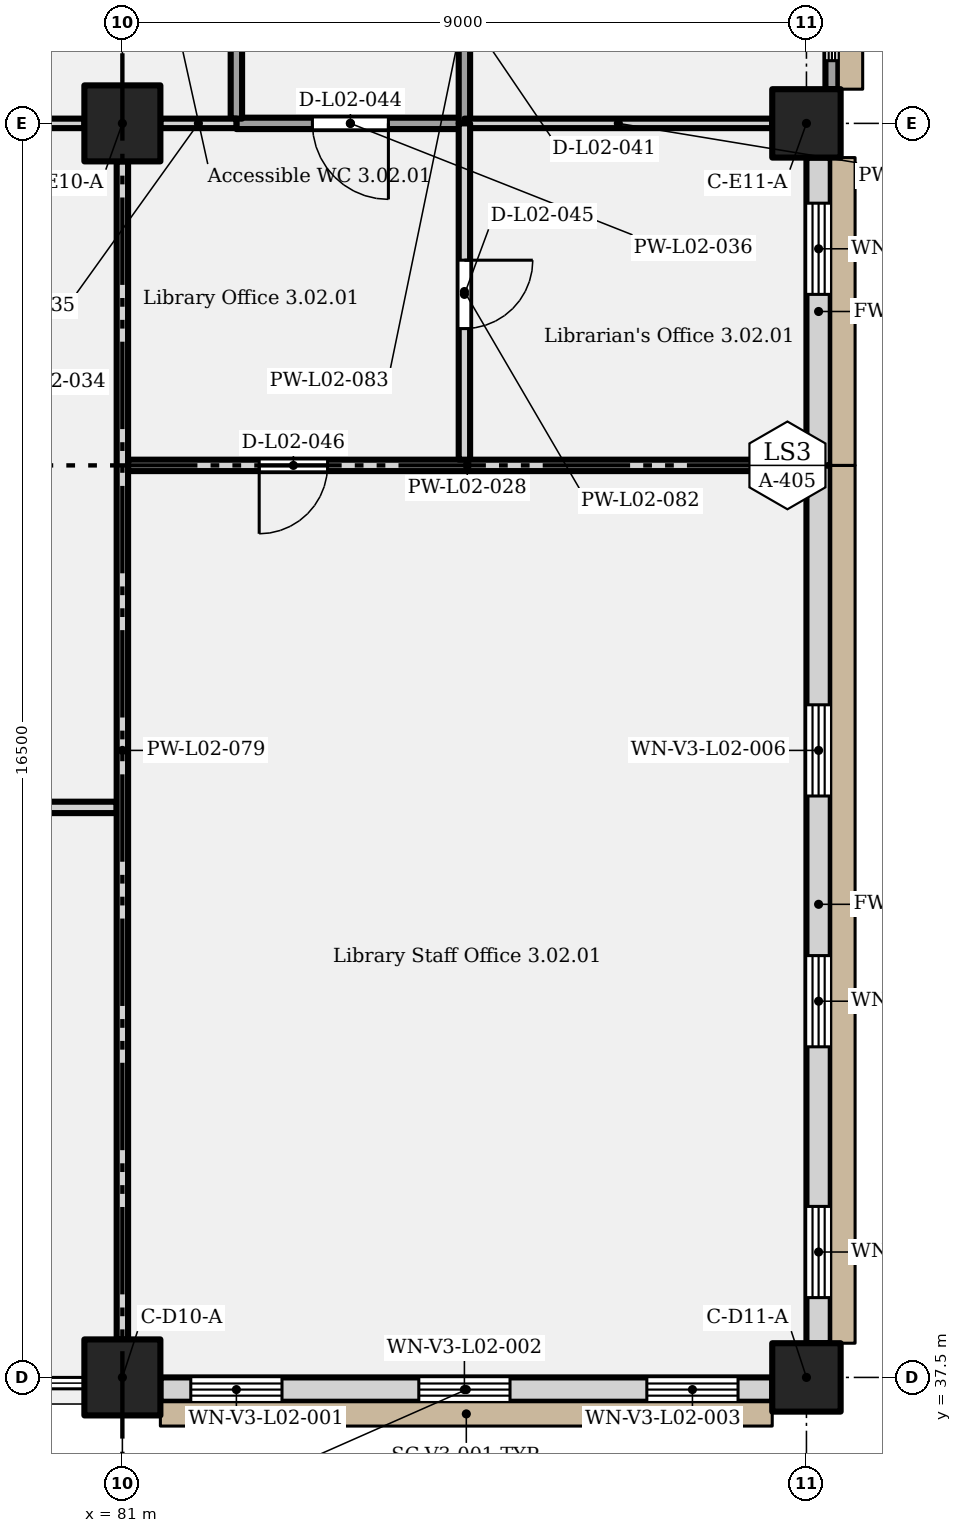
"""IFC4 building model, lengths in metres.
Left out: names, types, materials, properties, quantities, classifications, styles, units other than length and angle.
Written with IfcOpenShell. Run it as: python <this file> out.ifc"""

import sys

from ifc_helpers import new_model, si_unit, direction, frame, frame_2d, origin, origin_2d, place, context, subcontext, project, spatial, rectangle, extrude, element, fill, save


model = new_model("IFC4")
c1 = context("Model", 3, precision=1e-05, world=origin(), true_north=direction((0.0, 1.0)))
c2 = subcontext(c1, "Body", "Model", "MODEL_VIEW")
j1 = project(units=[si_unit("LENGTHUNIT", "METRE"), si_unit("PLANEANGLEUNIT", "RADIAN")], contexts=[c1])
p1 = place(None, origin())
s1 = spatial("IfcSite", under=j1, at=p1, CompositionType="ELEMENT")
p2 = place(p1, origin())
s2 = spatial("IfcBuilding", under=s1, at=p2, CompositionType="ELEMENT")
p3 = place(p2, frame((0.0, 0.0, 12.0)))
s3 = spatial("IfcBuildingStorey", under=s2, at=p3, CompositionType="ELEMENT", Elevation=12.0)
p4 = place(p3, frame((81.0, 37.5, 0.0), z_axis=(0.0, 0.0, 1.0), x_axis=(1.0, 0.0, 0.0)))
e1 = element("IfcColumn", 1, at=p4, inside=s3, PredefinedType="COLUMN", context=c2, shape_type="SweptSolid", body=[
    extrude(rectangle(XDim=1.0, YDim=1.0, at=origin_2d()), origin(), (0.0, 0.0, 1.0), 5.4),
])
p5 = place(p3, frame((90.0, 37.5, 0.0), z_axis=(0.0, 0.0, 1.0), x_axis=(1.0, 0.0, 0.0)))
e2 = element("IfcColumn", 2, at=p5, inside=s3, PredefinedType="COLUMN", context=c2, shape_type="SweptSolid", body=[
    extrude(rectangle(XDim=0.9, YDim=0.9, at=origin_2d()), origin(), (0.0, 0.0, 1.0), 5.4),
])
p6 = place(p3, frame((81.0, 54.0, 0.0), z_axis=(0.0, 0.0, 1.0), x_axis=(1.0, 0.0, 0.0)))
e3 = element("IfcColumn", 3, at=p6, inside=s3, PredefinedType="COLUMN", context=c2, shape_type="SweptSolid", body=[
    extrude(rectangle(XDim=1.0, YDim=1.0, at=origin_2d()), origin(), (0.0, 0.0, 1.0), 5.4),
])
p7 = place(p3, frame((90.0, 54.0, 0.0), z_axis=(0.0, 0.0, 1.0), x_axis=(1.0, 0.0, 0.0)))
e4 = element("IfcColumn", 4, at=p7, inside=s3, PredefinedType="COLUMN", context=c2, shape_type="SweptSolid", body=[
    extrude(rectangle(XDim=0.9, YDim=0.9, at=origin_2d()), origin(), (0.0, 0.0, 1.0), 5.4),
])
p8 = place(p3, frame((81.5, 37.34, 0.0), z_axis=(0.0, 0.0, 1.0), x_axis=(1.0, 0.0, 0.0)))
e5 = element("IfcWall", 5, at=p8, inside=s3, PredefinedType="SOLIDWALL", context=c2, shape_type="SweptSolid", body=[
    extrude(rectangle(XDim=8.05, YDim=0.32, at=frame_2d((4.025, 0.0))), origin(), (0.0, 0.0, 1.0), 5.15),
])
p9 = place(p8, frame((0.4, 0.0, 1.2)))
e6 = element("IfcOpeningElement", 6, at=p9, cuts=e5, PredefinedType="OPENING", context=c2, shape_type="SweptSolid", body=[
    extrude(rectangle(XDim=1.2, YDim=2.1, at=frame_2d((0.6, 1.05))), frame((0.0, 0.17, 0.0), z_axis=(0.0, -1.0, 0.0), x_axis=(1.0, 0.0, 0.0)), (0.0, 0.0, 1.0), 0.34),
])
p10 = place(p8, frame((3.4, 0.0, 1.2)))
e7 = element("IfcOpeningElement", 7, at=p10, cuts=e5, PredefinedType="OPENING", context=c2, shape_type="SweptSolid", body=[
    extrude(rectangle(XDim=1.2, YDim=2.1, at=frame_2d((0.6, 1.05))), frame((0.0, 0.17, 0.0), z_axis=(0.0, -1.0, 0.0), x_axis=(1.0, 0.0, 0.0)), (0.0, 0.0, 1.0), 0.34),
])
p11 = place(p8, frame((6.4, 0.0, 1.2)))
e8 = element("IfcOpeningElement", 8, at=p11, cuts=e5, PredefinedType="OPENING", context=c2, shape_type="SweptSolid", body=[
    extrude(rectangle(XDim=1.2, YDim=2.1, at=frame_2d((0.6, 1.05))), frame((0.0, 0.17, 0.0), z_axis=(0.0, -1.0, 0.0), x_axis=(1.0, 0.0, 0.0)), (0.0, 0.0, 1.0), 0.34),
])
p12 = place(p3, frame((90.16, 37.95, 0.0), z_axis=(0.0, 0.0, 1.0), x_axis=(0.0, 1.0, 0.0)))
e9 = element("IfcWall", 9, at=p12, inside=s3, PredefinedType="SOLIDWALL", context=c2, shape_type="SweptSolid", body=[
    extrude(rectangle(XDim=11.55, YDim=0.32, at=frame_2d((5.775, 0.0))), origin(), (0.0, 0.0, 1.0), 5.15),
])
p13 = place(p12, frame((0.6, 0.0, 1.2)))
e10 = element("IfcOpeningElement", 10, at=p13, cuts=e9, PredefinedType="OPENING", context=c2, shape_type="SweptSolid", body=[
    extrude(rectangle(XDim=1.2, YDim=2.1, at=frame_2d((0.6, 1.05))), frame((0.0, 0.17, 0.0), z_axis=(0.0, -1.0, 0.0), x_axis=(1.0, 0.0, 0.0)), (0.0, 0.0, 1.0), 0.34),
])
p14 = place(p12, frame((3.9, 0.0, 1.2)))
e11 = element("IfcOpeningElement", 11, at=p14, cuts=e9, PredefinedType="OPENING", context=c2, shape_type="SweptSolid", body=[
    extrude(rectangle(XDim=1.2, YDim=2.1, at=frame_2d((0.6, 1.05))), frame((0.0, 0.17, 0.0), z_axis=(0.0, -1.0, 0.0), x_axis=(1.0, 0.0, 0.0)), (0.0, 0.0, 1.0), 0.34),
])
p15 = place(p12, frame((7.2, 0.0, 1.2)))
e12 = element("IfcOpeningElement", 12, at=p15, cuts=e9, PredefinedType="OPENING", context=c2, shape_type="SweptSolid", body=[
    extrude(rectangle(XDim=1.2, YDim=2.1, at=frame_2d((0.6, 1.05))), frame((0.0, 0.17, 0.0), z_axis=(0.0, -1.0, 0.0), x_axis=(1.0, 0.0, 0.0)), (0.0, 0.0, 1.0), 0.34),
])
p16 = place(p3, frame((90.16, 49.5, 0.0), z_axis=(0.0, 0.0, 1.0), x_axis=(0.0, 1.0, 0.0)))
e13 = element("IfcWall", 13, at=p16, inside=s3, PredefinedType="SOLIDWALL", context=c2, shape_type="SweptSolid", body=[
    extrude(rectangle(XDim=4.05, YDim=0.32, at=frame_2d((2.025, 0.0))), origin(), (0.0, 0.0, 1.0), 5.15),
])
p17 = place(p16, frame((2.25, 0.0, 1.2)))
e14 = element("IfcOpeningElement", 14, at=p17, cuts=e13, PredefinedType="OPENING", context=c2, shape_type="SweptSolid", body=[
    extrude(rectangle(XDim=1.2, YDim=2.1, at=frame_2d((0.6, 1.05))), frame((0.0, 0.17, 0.0), z_axis=(0.0, -1.0, 0.0), x_axis=(1.0, 0.0, 0.0)), (0.0, 0.0, 1.0), 0.34),
])
p18 = place(p3, frame((90.335, 54.45, 0.0), z_axis=(0.0, 0.0, 1.0), x_axis=(0.0, 1.0, 0.0)))
e15 = element("IfcWall", 15, at=p18, inside=s3, PredefinedType="SOLIDWALL", context=c2, shape_type="SweptSolid", body=[
    extrude(rectangle(XDim=2.55, YDim=0.17, at=frame_2d((1.275, 0.0))), origin(), (0.0, 0.0, 1.0), 5.15),
])
p19 = place(p18, frame((0.375, 0.0, 1.2)))
e16 = element("IfcOpeningElement", 16, at=p19, cuts=e15, PredefinedType="OPENING", context=c2, shape_type="SweptSolid", body=[
    extrude(rectangle(XDim=1.35, YDim=2.55, at=frame_2d((0.675, 1.275))), frame((0.0, 0.095, 0.0), z_axis=(0.0, -1.0, 0.0), x_axis=(1.0, 0.0, 0.0)), (0.0, 0.0, 1.0), 0.19),
])
p20 = place(p3, frame((72.0, 45.0, 0.0), z_axis=(0.0, 0.0, 1.0), x_axis=(1.0, 0.0, 0.0)))
e17 = element("IfcWall", 17, at=p20, inside=s3, PredefinedType="PARTITIONING", context=c2, shape_type="SweptSolid", body=[
    extrude(rectangle(XDim=8.925, YDim=0.15, at=frame_2d((4.462, 0.0))), origin(), (0.0, 0.0, 1.0), 5.15),
])
p21 = place(p20, frame((3.9, 0.0, 0.0)))
e18 = element("IfcOpeningElement", 18, at=p21, cuts=e17, PredefinedType="OPENING", context=c2, shape_type="SweptSolid", body=[
    extrude(rectangle(XDim=1.2, YDim=2.4, at=frame_2d((0.6, 1.2))), frame((0.0, 0.085, 0.0), z_axis=(0.0, -1.0, 0.0), x_axis=(1.0, 0.0, 0.0)), (0.0, 0.0, 1.0), 0.17),
])
p22 = place(p3, frame((81.075, 49.5, 0.0), z_axis=(0.0, 0.0, 1.0), x_axis=(1.0, 0.0, 0.0)))
e19 = element("IfcWall", 19, at=p22, inside=s3, PredefinedType="PARTITIONING", context=c2, shape_type="SweptSolid", body=[
    extrude(rectangle(XDim=8.925, YDim=0.15, at=frame_2d((4.462, 0.0))), origin(), (0.0, 0.0, 1.0), 5.15),
])
p23 = place(p22, frame((2.625, 0.0, 0.0), z_axis=(0.0, 0.0, 1.0), x_axis=(-1.0, 0.0, 0.0)))
e20 = element("IfcOpeningElement", 20, at=p23, cuts=e19, PredefinedType="OPENING", context=c2, shape_type="SweptSolid", body=[
    extrude(rectangle(XDim=0.9, YDim=2.1, at=frame_2d((0.45, 1.05))), frame((0.0, 0.085, 0.0), z_axis=(0.0, -1.0, 0.0), x_axis=(1.0, 0.0, 0.0)), (0.0, 0.0, 1.0), 0.17),
])
for number, where, z_axis, x_axis in (
    (21, (79.5, 54.0, 0.0), (0.0, 0.0, 1.0), (1.0, 0.0, 0.0)),
    (22, (81.5, 54.0, 0.0), (0.0, 0.0, 1.0), (1.0, 0.0, 0.0)),
):
    element("IfcWall", number, at=place(p3, frame(where, z_axis=z_axis, x_axis=x_axis)), inside=s3, PredefinedType="PARTITIONING", context=c2, shape_type="SweptSolid", body=[
        extrude(rectangle(XDim=1.0, YDim=0.125, at=frame_2d((0.5, 0.0))), origin(), (0.0, 0.0, 1.0), 4.4),
    ])
p24 = place(p3, frame((82.5, 54.0, 0.0), z_axis=(0.0, 0.0, 1.0), x_axis=(1.0, 0.0, 0.0)))
e23 = element("IfcWall", 23, at=p24, inside=s3, PredefinedType="PARTITIONING", context=c2, shape_type="SweptSolid", body=[
    extrude(rectangle(XDim=3.0, YDim=0.15, at=frame_2d((1.5, 0.0))), origin(), (0.0, 0.0, 1.0), 4.4),
])
p25 = place(p24, frame((2.0, 0.0, 0.0), z_axis=(0.0, 0.0, 1.0), x_axis=(-1.0, 0.0, 0.0)))
e24 = element("IfcOpeningElement", 24, at=p25, cuts=e23, PredefinedType="OPENING", context=c2, shape_type="SweptSolid", body=[
    extrude(rectangle(XDim=1.0, YDim=2.1, at=frame_2d((0.5, 1.05))), frame((0.0, 0.085, 0.0), z_axis=(0.0, -1.0, 0.0), x_axis=(1.0, 0.0, 0.0)), (0.0, 0.0, 1.0), 0.17),
])
p26 = place(p3, frame((85.5, 54.0, 0.0), z_axis=(0.0, 0.0, 1.0), x_axis=(1.0, 0.0, 0.0)))
e25 = element("IfcWall", 25, at=p26, inside=s3, PredefinedType="PARTITIONING", context=c2, shape_type="SweptSolid", body=[
    extrude(rectangle(XDim=4.05, YDim=0.125, at=frame_2d((2.025, 0.0))), origin(), (0.0, 0.0, 1.0), 4.4),
])
p27 = place(p3, frame((81.0, 38.0, 0.0), z_axis=(0.0, 0.0, 1.0), x_axis=(0.0, 1.0, 0.0)))
e26 = element("IfcWall", 26, at=p27, inside=s3, PredefinedType="PARTITIONING", context=c2, shape_type="SweptSolid", body=[
    extrude(rectangle(XDim=15.5, YDim=0.15, at=frame_2d((7.75, 0.0))), origin(), (0.0, 0.0, 1.0), 4.2),
])
p28 = place(p3, frame((82.5, 54.062, 0.0), z_axis=(0.0, 0.0, 1.0), x_axis=(0.0, 1.0, 0.0)))
e27 = element("IfcWall", 27, at=p28, inside=s3, PredefinedType="PARTITIONING", context=c2, shape_type="SweptSolid", body=[
    extrude(rectangle(XDim=2.938, YDim=0.15, at=frame_2d((1.469, 0.0))), origin(), (0.0, 0.0, 1.0), 5.15),
])
p29 = place(p3, frame((85.5, 49.575, 0.0), z_axis=(0.0, 0.0, 1.0), x_axis=(0.0, 1.0, 0.0)))
e28 = element("IfcWall", 28, at=p29, inside=s3, PredefinedType="PARTITIONING", context=c2, shape_type="SweptSolid", body=[
    extrude(rectangle(XDim=4.425, YDim=0.15, at=frame_2d((2.212, 0.0))), origin(), (0.0, 0.0, 1.0), 5.15),
])
p30 = place(p29, frame((2.625, 0.0, 0.0), z_axis=(0.0, 0.0, 1.0), x_axis=(-1.0, 0.0, 0.0)))
e29 = element("IfcOpeningElement", 29, at=p30, cuts=e28, PredefinedType="OPENING", context=c2, shape_type="SweptSolid", body=[
    extrude(rectangle(XDim=0.9, YDim=2.1, at=frame_2d((0.45, 1.05))), frame((0.0, 0.085, 0.0), z_axis=(0.0, -1.0, 0.0), x_axis=(1.0, 0.0, 0.0)), (0.0, 0.0, 1.0), 0.17),
])
p31 = place(p3, frame((85.5, 54.0, 0.0), z_axis=(0.0, 0.0, 1.0), x_axis=(0.0, 1.0, 0.0)))
e30 = element("IfcWall", 30, at=p31, inside=s3, PredefinedType="PARTITIONING", context=c2, shape_type="SweptSolid", body=[
    extrude(rectangle(XDim=3.0, YDim=0.15, at=frame_2d((1.5, 0.0))), origin(), (0.0, 0.0, 1.0), 5.15),
])
p32 = place(p31, frame((1.95, 0.0, 0.0), z_axis=(0.0, 0.0, 1.0), x_axis=(-1.0, 0.0, 0.0)))
e31 = element("IfcOpeningElement", 31, at=p32, cuts=e30, PredefinedType="OPENING", context=c2, shape_type="SweptSolid", body=[
    extrude(rectangle(XDim=0.9, YDim=2.1, at=frame_2d((0.45, 1.05))), frame((0.0, 0.085, 0.0), z_axis=(0.0, -1.0, 0.0), x_axis=(1.0, 0.0, 0.0)), (0.0, 0.0, 1.0), 0.17),
])
p33 = place(p9, origin())
e32 = element("IfcWindow", 32, at=p33, inside=s3, PartitioningType="SINGLE_PANEL", PredefinedType="WINDOW", context=c2, shape_type="SweptSolid", body=[
    extrude(rectangle(XDim=1.2, YDim=2.1, at=frame_2d((0.6, 1.05))), frame((0.0, 0.03, 0.0), z_axis=(0.0, -1.0, 0.0), x_axis=(1.0, 0.0, 0.0)), (0.0, 0.0, 1.0), 0.06),
])
fill(e6, e32)
p34 = place(p10, origin())
e33 = element("IfcWindow", 33, at=p34, inside=s3, PartitioningType="SINGLE_PANEL", PredefinedType="WINDOW", context=c2, shape_type="SweptSolid", body=[
    extrude(rectangle(XDim=1.2, YDim=2.1, at=frame_2d((0.6, 1.05))), frame((0.0, 0.03, 0.0), z_axis=(0.0, -1.0, 0.0), x_axis=(1.0, 0.0, 0.0)), (0.0, 0.0, 1.0), 0.06),
])
fill(e7, e33)
p35 = place(p11, origin())
e34 = element("IfcWindow", 34, at=p35, inside=s3, PartitioningType="SINGLE_PANEL", PredefinedType="WINDOW", context=c2, shape_type="SweptSolid", body=[
    extrude(rectangle(XDim=1.2, YDim=2.1, at=frame_2d((0.6, 1.05))), frame((0.0, 0.03, 0.0), z_axis=(0.0, -1.0, 0.0), x_axis=(1.0, 0.0, 0.0)), (0.0, 0.0, 1.0), 0.06),
])
fill(e8, e34)
p36 = place(p13, origin())
e35 = element("IfcWindow", 35, at=p36, inside=s3, PartitioningType="SINGLE_PANEL", PredefinedType="WINDOW", context=c2, shape_type="SweptSolid", body=[
    extrude(rectangle(XDim=1.2, YDim=2.1, at=frame_2d((0.6, 1.05))), frame((0.0, 0.03, 0.0), z_axis=(0.0, -1.0, 0.0), x_axis=(1.0, 0.0, 0.0)), (0.0, 0.0, 1.0), 0.06),
])
fill(e10, e35)
p37 = place(p14, origin())
e36 = element("IfcWindow", 36, at=p37, inside=s3, PartitioningType="SINGLE_PANEL", PredefinedType="WINDOW", context=c2, shape_type="SweptSolid", body=[
    extrude(rectangle(XDim=1.2, YDim=2.1, at=frame_2d((0.6, 1.05))), frame((0.0, 0.03, 0.0), z_axis=(0.0, -1.0, 0.0), x_axis=(1.0, 0.0, 0.0)), (0.0, 0.0, 1.0), 0.06),
])
fill(e11, e36)
p38 = place(p15, origin())
e37 = element("IfcWindow", 37, at=p38, inside=s3, PartitioningType="SINGLE_PANEL", PredefinedType="WINDOW", context=c2, shape_type="SweptSolid", body=[
    extrude(rectangle(XDim=1.2, YDim=2.1, at=frame_2d((0.6, 1.05))), frame((0.0, 0.03, 0.0), z_axis=(0.0, -1.0, 0.0), x_axis=(1.0, 0.0, 0.0)), (0.0, 0.0, 1.0), 0.06),
])
fill(e12, e37)
p39 = place(p17, origin())
e38 = element("IfcWindow", 38, at=p39, inside=s3, PartitioningType="SINGLE_PANEL", PredefinedType="WINDOW", context=c2, shape_type="SweptSolid", body=[
    extrude(rectangle(XDim=1.2, YDim=2.1, at=frame_2d((0.6, 1.05))), frame((0.0, 0.03, 0.0), z_axis=(0.0, -1.0, 0.0), x_axis=(1.0, 0.0, 0.0)), (0.0, 0.0, 1.0), 0.06),
])
fill(e14, e38)
p40 = place(p19, origin())
e39 = element("IfcWindow", 39, at=p40, inside=s3, PartitioningType="SINGLE_PANEL", PredefinedType="WINDOW", context=c2, shape_type="SweptSolid", body=[
    extrude(rectangle(XDim=1.35, YDim=2.55, at=frame_2d((0.675, 1.275))), frame((0.0, 0.03, 0.0), z_axis=(0.0, -1.0, 0.0), x_axis=(1.0, 0.0, 0.0)), (0.0, 0.0, 1.0), 0.06),
])
fill(e16, e39)
p41 = place(p25, origin())
e40 = element("IfcDoor", 40, at=p41, inside=s3, OperationType="SINGLE_SWING_LEFT", PredefinedType="DOOR", context=c2, shape_type="SweptSolid", body=[
    extrude(rectangle(XDim=1.0, YDim=2.1, at=frame_2d((0.5, 1.05))), frame((0.0, 0.025, 0.0), z_axis=(0.0, -1.0, 0.0), x_axis=(1.0, 0.0, 0.0)), (0.0, 0.0, 1.0), 0.05),
])
fill(e24, e40)
p42 = place(p30, origin())
e41 = element("IfcDoor", 41, at=p42, inside=s3, OperationType="SINGLE_SWING_LEFT", PredefinedType="DOOR", context=c2, shape_type="SweptSolid", body=[
    extrude(rectangle(XDim=0.9, YDim=2.1, at=frame_2d((0.45, 1.05))), frame((0.0, 0.025, 0.0), z_axis=(0.0, -1.0, 0.0), x_axis=(1.0, 0.0, 0.0)), (0.0, 0.0, 1.0), 0.05),
])
fill(e29, e41)
p43 = place(p23, origin())
e42 = element("IfcDoor", 42, at=p43, inside=s3, OperationType="SINGLE_SWING_RIGHT", PredefinedType="DOOR", context=c2, shape_type="SweptSolid", body=[
    extrude(rectangle(XDim=0.9, YDim=2.1, at=frame_2d((0.45, 1.05))), frame((0.0, 0.025, 0.0), z_axis=(0.0, -1.0, 0.0), x_axis=(1.0, 0.0, 0.0)), (0.0, 0.0, 1.0), 0.05),
])
fill(e20, e42)
save(model, sys.argv[1])
